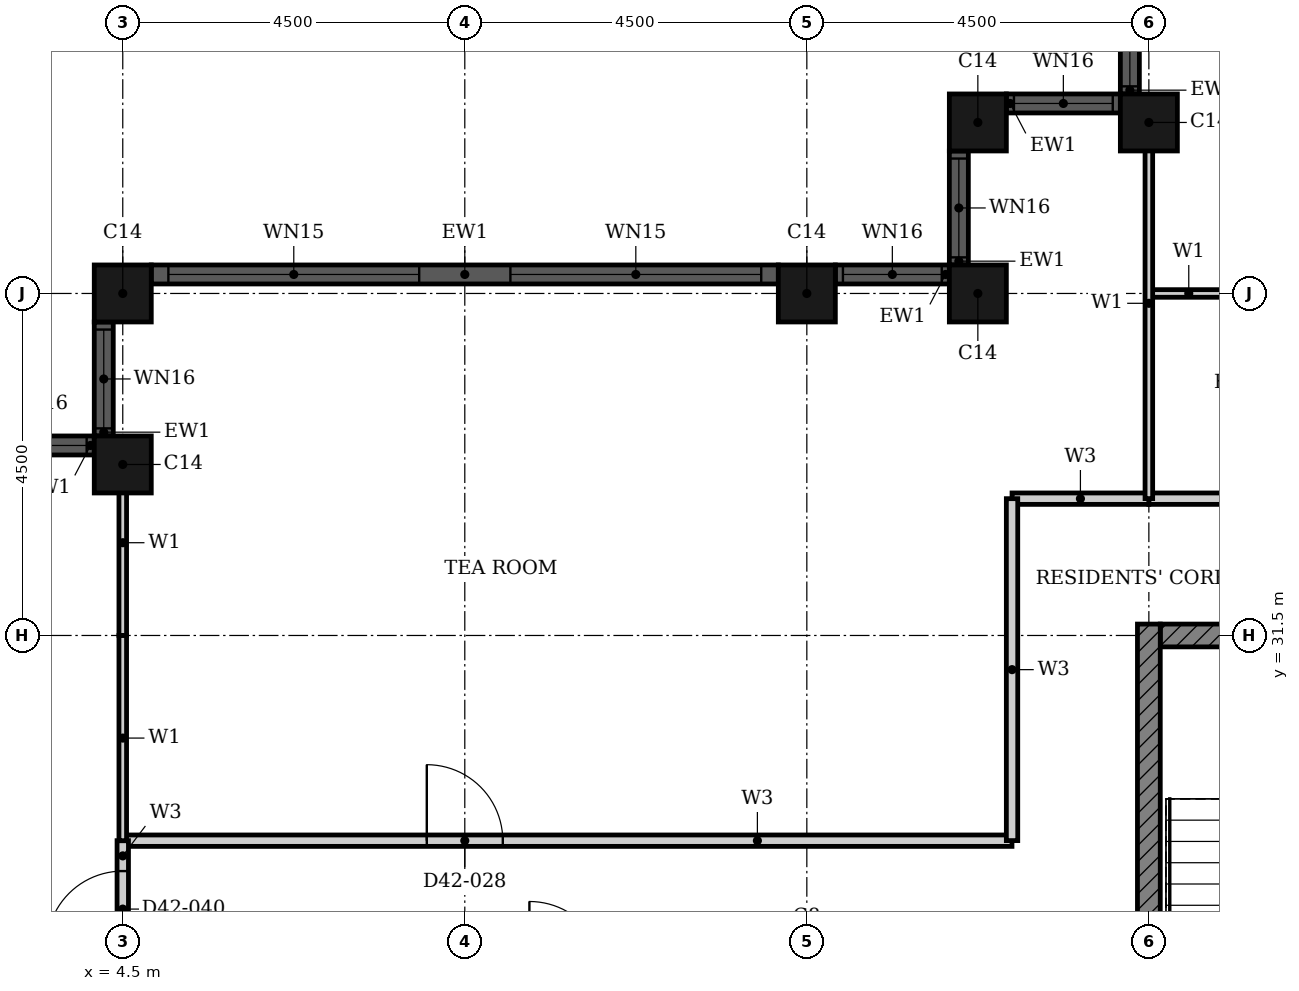
"""IFC4 building model, lengths in metres.
Left out: names, types, materials, properties, quantities, classifications, styles, units other than length and angle.
Written with IfcOpenShell. Run it as: python <this file> out.ifc"""

import sys

from ifc_helpers import new_model, si_unit, direction, frame, frame_2d, origin, origin_2d, place, context, subcontext, project, spatial, rectangle, hollow_rectangle, extrude, element, fill, save


model = new_model("IFC4")
c1 = context("Model", 3, precision=1e-05, world=origin(), true_north=direction((0.0, 1.0)))
c2 = subcontext(c1, "Body", "Model", "MODEL_VIEW")
j1 = project(units=[si_unit("LENGTHUNIT", "METRE"), si_unit("PLANEANGLEUNIT", "RADIAN")], contexts=[c1])
p1 = place(None, origin())
s1 = spatial("IfcSite", under=j1, at=p1, CompositionType="ELEMENT")
p2 = place(p1, origin())
s2 = spatial("IfcBuilding", under=s1, at=p2, CompositionType="ELEMENT")
p3 = place(p2, frame((0.0, 0.0, 169.1)))
s3 = spatial("IfcBuildingStorey", under=s2, at=p3, CompositionType="ELEMENT", Elevation=169.1)
for number, where, z_axis, x_axis in (
    (1, (18.0, 38.25, 0.0), (0.0, 0.0, 1.0), (1.0, 0.0, 0.0)),
    (2, (15.75, 38.25, 0.0), (0.0, 0.0, 1.0), (1.0, 0.0, 0.0)),
    (3, (15.75, 36.0, 0.0), (0.0, 0.0, 1.0), (1.0, 0.0, 0.0)),
    (4, (13.5, 36.0, 0.0), (0.0, 0.0, 1.0), (1.0, 0.0, 0.0)),
    (5, (4.5, 36.0, 0.0), (0.0, 0.0, 1.0), (1.0, 0.0, 0.0)),
    (6, (4.5, 33.75, 0.0), (0.0, 0.0, 1.0), (1.0, 0.0, 0.0)),
):
    element("IfcColumn", number, at=place(p3, frame(where, z_axis=z_axis, x_axis=x_axis)), inside=s3, PredefinedType="COLUMN", context=c2, shape_type="SweptSolid", body=[
        extrude(hollow_rectangle(XDim=0.75, YDim=0.75, WallThickness=0.024, at=origin_2d()), origin(), (0.0, 0.0, 1.0), 3.7),
    ])
p4 = place(p3, frame((17.75, 40.125, 0.0), z_axis=(0.0, 0.0, 1.0), x_axis=(0.0, -1.0, 0.0)))
e7 = element("IfcWall", 7, at=p4, inside=s3, PredefinedType="SOLIDWALL", context=c2, shape_type="SweptSolid", body=[
    extrude(rectangle(XDim=1.5, YDim=0.25, at=frame_2d((0.75, 0.0))), origin(), (0.0, 0.0, 1.0), 3.7),
])
p5 = place(p4, frame((0.1, 0.0, 0.9)))
e8 = element("IfcOpeningElement", 8, at=p5, cuts=e7, PredefinedType="OPENING", context=c2, shape_type="SweptSolid", body=[
    extrude(rectangle(XDim=1.3, YDim=1.85, at=frame_2d((0.65, 0.925))), frame((0.0, 0.135, 0.0), z_axis=(0.0, -1.0, 0.0), x_axis=(1.0, 0.0, 0.0)), (0.0, 0.0, 1.0), 0.27),
])
p6 = place(p3, frame((17.625, 38.5, 0.0), z_axis=(0.0, 0.0, 1.0), x_axis=(-1.0, 0.0, 0.0)))
e9 = element("IfcWall", 9, at=p6, inside=s3, PredefinedType="SOLIDWALL", context=c2, shape_type="SweptSolid", body=[
    extrude(rectangle(XDim=1.5, YDim=0.25, at=frame_2d((0.75, 0.0))), origin(), (0.0, 0.0, 1.0), 3.7),
])
p7 = place(p6, frame((0.1, 0.0, 0.9)))
e10 = element("IfcOpeningElement", 10, at=p7, cuts=e9, PredefinedType="OPENING", context=c2, shape_type="SweptSolid", body=[
    extrude(rectangle(XDim=1.3, YDim=1.85, at=frame_2d((0.65, 0.925))), frame((0.0, 0.135, 0.0), z_axis=(0.0, -1.0, 0.0), x_axis=(1.0, 0.0, 0.0)), (0.0, 0.0, 1.0), 0.27),
])
p8 = place(p3, frame((15.5, 37.875, 0.0), z_axis=(0.0, 0.0, 1.0), x_axis=(0.0, -1.0, 0.0)))
e11 = element("IfcWall", 11, at=p8, inside=s3, PredefinedType="SOLIDWALL", context=c2, shape_type="SweptSolid", body=[
    extrude(rectangle(XDim=1.5, YDim=0.25, at=frame_2d((0.75, 0.0))), origin(), (0.0, 0.0, 1.0), 3.7),
])
p9 = place(p8, frame((0.1, 0.0, 0.9)))
e12 = element("IfcOpeningElement", 12, at=p9, cuts=e11, PredefinedType="OPENING", context=c2, shape_type="SweptSolid", body=[
    extrude(rectangle(XDim=1.3, YDim=1.85, at=frame_2d((0.65, 0.925))), frame((0.0, 0.135, 0.0), z_axis=(0.0, -1.0, 0.0), x_axis=(1.0, 0.0, 0.0)), (0.0, 0.0, 1.0), 0.27),
])
p10 = place(p3, frame((15.375, 36.25, 0.0), z_axis=(0.0, 0.0, 1.0), x_axis=(-1.0, 0.0, 0.0)))
e13 = element("IfcWall", 13, at=p10, inside=s3, PredefinedType="SOLIDWALL", context=c2, shape_type="SweptSolid", body=[
    extrude(rectangle(XDim=1.5, YDim=0.25, at=frame_2d((0.75, 0.0))), origin(), (0.0, 0.0, 1.0), 3.7),
])
p11 = place(p10, frame((0.1, 0.0, 0.9)))
e14 = element("IfcOpeningElement", 14, at=p11, cuts=e13, PredefinedType="OPENING", context=c2, shape_type="SweptSolid", body=[
    extrude(rectangle(XDim=1.3, YDim=1.85, at=frame_2d((0.65, 0.925))), frame((0.0, 0.135, 0.0), z_axis=(0.0, -1.0, 0.0), x_axis=(1.0, 0.0, 0.0)), (0.0, 0.0, 1.0), 0.27),
])
p12 = place(p3, frame((13.125, 36.25, 0.0), z_axis=(0.0, 0.0, 1.0), x_axis=(-1.0, 0.0, 0.0)))
e15 = element("IfcWall", 15, at=p12, inside=s3, PredefinedType="SOLIDWALL", context=c2, shape_type="SweptSolid", body=[
    extrude(rectangle(XDim=8.25, YDim=0.25, at=frame_2d((4.125, 0.0))), origin(), (0.0, 0.0, 1.0), 3.7),
])
p13 = place(p12, frame((0.225, 0.0, 0.45)))
e16 = element("IfcOpeningElement", 16, at=p13, cuts=e15, PredefinedType="OPENING", context=c2, shape_type="SweptSolid", body=[
    extrude(rectangle(XDim=3.3, YDim=2.3, at=frame_2d((1.65, 1.15))), frame((0.0, 0.135, 0.0), z_axis=(0.0, -1.0, 0.0), x_axis=(1.0, 0.0, 0.0)), (0.0, 0.0, 1.0), 0.27),
])
p14 = place(p12, frame((4.725, 0.0, 0.45)))
e17 = element("IfcOpeningElement", 17, at=p14, cuts=e15, PredefinedType="OPENING", context=c2, shape_type="SweptSolid", body=[
    extrude(rectangle(XDim=3.3, YDim=2.3, at=frame_2d((1.65, 1.15))), frame((0.0, 0.135, 0.0), z_axis=(0.0, -1.0, 0.0), x_axis=(1.0, 0.0, 0.0)), (0.0, 0.0, 1.0), 0.27),
])
p15 = place(p3, frame((4.25, 35.625, 0.0), z_axis=(0.0, 0.0, 1.0), x_axis=(0.0, -1.0, 0.0)))
e18 = element("IfcWall", 18, at=p15, inside=s3, PredefinedType="SOLIDWALL", context=c2, shape_type="SweptSolid", body=[
    extrude(rectangle(XDim=1.5, YDim=0.25, at=frame_2d((0.75, 0.0))), origin(), (0.0, 0.0, 1.0), 3.7),
])
p16 = place(p15, frame((0.1, 0.0, 0.9)))
e19 = element("IfcOpeningElement", 19, at=p16, cuts=e18, PredefinedType="OPENING", context=c2, shape_type="SweptSolid", body=[
    extrude(rectangle(XDim=1.3, YDim=1.85, at=frame_2d((0.65, 0.925))), frame((0.0, 0.135, 0.0), z_axis=(0.0, -1.0, 0.0), x_axis=(1.0, 0.0, 0.0)), (0.0, 0.0, 1.0), 0.27),
])
p17 = place(p3, frame((4.125, 34.0, 0.0), z_axis=(0.0, 0.0, 1.0), x_axis=(-1.0, 0.0, 0.0)))
e20 = element("IfcWall", 20, at=p17, inside=s3, PredefinedType="SOLIDWALL", context=c2, shape_type="SweptSolid", body=[
    extrude(rectangle(XDim=1.5, YDim=0.25, at=frame_2d((0.75, 0.0))), origin(), (0.0, 0.0, 1.0), 3.7),
])
p18 = place(p17, frame((0.1, 0.0, 0.9)))
e21 = element("IfcOpeningElement", 21, at=p18, cuts=e20, PredefinedType="OPENING", context=c2, shape_type="SweptSolid", body=[
    extrude(rectangle(XDim=1.3, YDim=1.85, at=frame_2d((0.65, 0.925))), frame((0.0, 0.135, 0.0), z_axis=(0.0, -1.0, 0.0), x_axis=(1.0, 0.0, 0.0)), (0.0, 0.0, 1.0), 0.27),
])
p19 = place(p3, frame((18.15, 31.5, 0.0), z_axis=(0.0, 0.0, 1.0), x_axis=(1.0, 0.0, 0.0)))
e22 = element("IfcWall", 22, at=p19, inside=s3, PredefinedType="SHEAR", context=c2, shape_type="SweptSolid", body=[
    extrude(rectangle(XDim=9.368, YDim=0.3, at=frame_2d((4.684, 0.0))), origin(), (0.0, 0.0, 1.0), 3.4),
])
p20 = place(p19, frame((4.736, 0.0, 0.0)))
e23 = element("IfcOpeningElement", 23, at=p20, cuts=e22, PredefinedType="OPENING", context=c2, shape_type="SweptSolid", body=[
    extrude(rectangle(XDim=1.8, YDim=2.1, at=frame_2d((0.9, 1.05))), frame((0.0, 0.16, 0.0), z_axis=(0.0, -1.0, 0.0), x_axis=(1.0, 0.0, 0.0)), (0.0, 0.0, 1.0), 0.32),
])
p21 = place(p3, frame((18.0, 22.35, 0.0), z_axis=(0.0, 0.0, 1.0), x_axis=(0.0, 1.0, 0.0)))
e24 = element("IfcWall", 24, at=p21, inside=s3, PredefinedType="SHEAR", context=c2, shape_type="SweptSolid", body=[
    extrude(rectangle(XDim=9.3, YDim=0.3, at=frame_2d((4.65, 0.0))), origin(), (0.0, 0.0, 1.0), 3.4),
])
p22 = place(p3, frame((4.5, 28.8, 0.0), z_axis=(0.0, 0.0, 1.0), x_axis=(1.0, 0.0, 0.0)))
e25 = element("IfcWall", 25, at=p22, inside=s3, PredefinedType="PARTITIONING", context=c2, shape_type="SweptSolid", body=[
    extrude(rectangle(XDim=11.699, YDim=0.15, at=frame_2d((5.85, 0.0))), origin(), (0.0, 0.0, 1.0), 3.4),
])
p23 = place(p22, frame((4.0, 0.0, 0.0)))
e26 = element("IfcOpeningElement", 26, at=p23, cuts=e25, PredefinedType="OPENING", context=c2, shape_type="SweptSolid", body=[
    extrude(rectangle(XDim=1.0, YDim=2.1, at=frame_2d((0.5, 1.05))), frame((0.0, 0.085, 0.0), z_axis=(0.0, -1.0, 0.0), x_axis=(1.0, 0.0, 0.0)), (0.0, 0.0, 1.0), 0.17),
])
p24 = place(p3, frame((18.0, 33.3, 0.0), z_axis=(0.0, 0.0, 1.0), x_axis=(1.0, 0.0, 0.0)))
e27 = element("IfcWall", 27, at=p24, inside=s3, PredefinedType="PARTITIONING", context=c2, shape_type="SweptSolid", body=[
    extrude(rectangle(XDim=6.6, YDim=0.15, at=frame_2d((3.3, 0.0))), origin(), (0.0, 0.0, 1.0), 3.4),
])
p25 = place(p24, frame((4.3, 0.0, 0.0)))
e28 = element("IfcOpeningElement", 28, at=p25, cuts=e27, PredefinedType="OPENING", context=c2, shape_type="SweptSolid", body=[
    extrude(rectangle(XDim=1.0, YDim=2.2, at=frame_2d((0.5, 1.1))), frame((0.0, 0.085, 0.0), z_axis=(0.0, -1.0, 0.0), x_axis=(1.0, 0.0, 0.0)), (0.0, 0.0, 1.0), 0.17),
])
p26 = place(p3, frame((16.2, 33.3, 0.0), z_axis=(0.0, 0.0, 1.0), x_axis=(1.0, 0.0, 0.0)))
e29 = element("IfcWall", 29, at=p26, inside=s3, PredefinedType="PARTITIONING", context=c2, shape_type="SweptSolid", body=[
    extrude(rectangle(XDim=1.799, YDim=0.15, at=frame_2d((0.899, 0.0))), origin(), (0.0, 0.0, 1.0), 3.4),
])
p27 = place(p3, frame((16.2, 28.801, 0.0), z_axis=(0.0, 0.0, 1.0), x_axis=(0.0, 1.0, 0.0)))
e30 = element("IfcWall", 30, at=p27, inside=s3, PredefinedType="PARTITIONING", context=c2, shape_type="SweptSolid", body=[
    extrude(rectangle(XDim=4.499, YDim=0.15, at=frame_2d((2.25, 0.0))), origin(), (0.0, 0.0, 1.0), 3.4),
])
p28 = place(p3, frame((4.5, 27.0, 0.0), z_axis=(0.0, 0.0, 1.0), x_axis=(0.0, 1.0, 0.0)))
e31 = element("IfcWall", 31, at=p28, inside=s3, PredefinedType="PARTITIONING", context=c2, shape_type="SweptSolid", body=[
    extrude(rectangle(XDim=1.8, YDim=0.15, at=frame_2d((0.9, 0.0))), origin(), (0.0, 0.0, 1.0), 3.4),
])
p29 = place(p28, frame((0.4, 0.0, 0.0)))
e32 = element("IfcOpeningElement", 32, at=p29, cuts=e31, PredefinedType="OPENING", context=c2, shape_type="SweptSolid", body=[
    extrude(rectangle(XDim=1.0, YDim=2.2, at=frame_2d((0.5, 1.1))), frame((0.0, 0.085, 0.0), z_axis=(0.0, -1.0, 0.0), x_axis=(1.0, 0.0, 0.0)), (0.0, 0.0, 1.0), 0.17),
])
p30 = place(p3, frame((18.0, 36.0, 0.0), z_axis=(0.0, 0.0, 1.0), x_axis=(1.0, 0.0, 0.0)))
e33 = element("IfcWall", 33, at=p30, inside=s3, PredefinedType="PARTITIONING", context=c2, shape_type="SweptSolid", body=[
    extrude(rectangle(XDim=3.0, YDim=0.1, at=frame_2d((1.5, 0.0))), origin(), (0.0, 0.0, 1.0), 3.4),
])
p31 = place(p30, frame((1.05, 0.0, 0.0)))
e34 = element("IfcOpeningElement", 34, at=p31, cuts=e33, PredefinedType="OPENING", context=c2, shape_type="SweptSolid", body=[
    extrude(rectangle(XDim=0.9, YDim=2.1, at=frame_2d((0.45, 1.05))), frame((0.0, 0.06, 0.0), z_axis=(0.0, -1.0, 0.0), x_axis=(1.0, 0.0, 0.0)), (0.0, 0.0, 1.0), 0.12),
])
p32 = place(p3, frame((18.0, 33.301, 0.0), z_axis=(0.0, 0.0, 1.0), x_axis=(0.0, 1.0, 0.0)))
e35 = element("IfcWall", 35, at=p32, inside=s3, PredefinedType="PARTITIONING", context=c2, shape_type="SweptSolid", body=[
    extrude(rectangle(XDim=5.139, YDim=0.1, at=frame_2d((2.569, 0.0))), origin(), (0.0, 0.0, 1.0), 3.4),
])
p33 = place(p3, frame((4.5, 28.8, 0.0), z_axis=(0.0, 0.0, 1.0), x_axis=(0.0, 1.0, 0.0)))
e36 = element("IfcWall", 36, at=p33, inside=s3, PredefinedType="PARTITIONING", context=c2, shape_type="SweptSolid", body=[
    extrude(rectangle(XDim=2.7, YDim=0.1, at=frame_2d((1.35, 0.0))), origin(), (0.0, 0.0, 1.0), 3.4),
])
p34 = place(p3, frame((4.5, 31.501, 0.0), z_axis=(0.0, 0.0, 1.0), x_axis=(0.0, 1.0, 0.0)))
e37 = element("IfcWall", 37, at=p34, inside=s3, PredefinedType="PARTITIONING", context=c2, shape_type="SweptSolid", body=[
    extrude(rectangle(XDim=2.439, YDim=0.1, at=frame_2d((1.219, 0.0))), origin(), (0.0, 0.0, 1.0), 3.4),
])
p35 = place(p5, origin())
e38 = element("IfcWindow", 38, at=p35, inside=s3, PartitioningType="SINGLE_PANEL", PredefinedType="WINDOW", context=c2, shape_type="SweptSolid", body=[
    extrude(rectangle(XDim=1.3, YDim=1.85, at=frame_2d((0.65, 0.925))), frame((0.0, 0.03, 0.0), z_axis=(0.0, -1.0, 0.0), x_axis=(1.0, 0.0, 0.0)), (0.0, 0.0, 1.0), 0.06),
])
fill(e8, e38)
p36 = place(p7, origin())
e39 = element("IfcWindow", 39, at=p36, inside=s3, PartitioningType="SINGLE_PANEL", PredefinedType="WINDOW", context=c2, shape_type="SweptSolid", body=[
    extrude(rectangle(XDim=1.3, YDim=1.85, at=frame_2d((0.65, 0.925))), frame((0.0, 0.03, 0.0), z_axis=(0.0, -1.0, 0.0), x_axis=(1.0, 0.0, 0.0)), (0.0, 0.0, 1.0), 0.06),
])
fill(e10, e39)
p37 = place(p9, origin())
e40 = element("IfcWindow", 40, at=p37, inside=s3, PartitioningType="SINGLE_PANEL", PredefinedType="WINDOW", context=c2, shape_type="SweptSolid", body=[
    extrude(rectangle(XDim=1.3, YDim=1.85, at=frame_2d((0.65, 0.925))), frame((0.0, 0.03, 0.0), z_axis=(0.0, -1.0, 0.0), x_axis=(1.0, 0.0, 0.0)), (0.0, 0.0, 1.0), 0.06),
])
fill(e12, e40)
p38 = place(p11, origin())
e41 = element("IfcWindow", 41, at=p38, inside=s3, PartitioningType="SINGLE_PANEL", PredefinedType="WINDOW", context=c2, shape_type="SweptSolid", body=[
    extrude(rectangle(XDim=1.3, YDim=1.85, at=frame_2d((0.65, 0.925))), frame((0.0, 0.03, 0.0), z_axis=(0.0, -1.0, 0.0), x_axis=(1.0, 0.0, 0.0)), (0.0, 0.0, 1.0), 0.06),
])
fill(e14, e41)
p39 = place(p13, origin())
e42 = element("IfcWindow", 42, at=p39, inside=s3, PartitioningType="SINGLE_PANEL", PredefinedType="WINDOW", context=c2, shape_type="SweptSolid", body=[
    extrude(rectangle(XDim=3.3, YDim=2.3, at=frame_2d((1.65, 1.15))), frame((0.0, 0.03, 0.0), z_axis=(0.0, -1.0, 0.0), x_axis=(1.0, 0.0, 0.0)), (0.0, 0.0, 1.0), 0.06),
])
fill(e16, e42)
p40 = place(p14, origin())
e43 = element("IfcWindow", 43, at=p40, inside=s3, PartitioningType="SINGLE_PANEL", PredefinedType="WINDOW", context=c2, shape_type="SweptSolid", body=[
    extrude(rectangle(XDim=3.3, YDim=2.3, at=frame_2d((1.65, 1.15))), frame((0.0, 0.03, 0.0), z_axis=(0.0, -1.0, 0.0), x_axis=(1.0, 0.0, 0.0)), (0.0, 0.0, 1.0), 0.06),
])
fill(e17, e43)
p41 = place(p16, origin())
e44 = element("IfcWindow", 44, at=p41, inside=s3, PartitioningType="SINGLE_PANEL", PredefinedType="WINDOW", context=c2, shape_type="SweptSolid", body=[
    extrude(rectangle(XDim=1.3, YDim=1.85, at=frame_2d((0.65, 0.925))), frame((0.0, 0.03, 0.0), z_axis=(0.0, -1.0, 0.0), x_axis=(1.0, 0.0, 0.0)), (0.0, 0.0, 1.0), 0.06),
])
fill(e19, e44)
p42 = place(p18, origin())
e45 = element("IfcWindow", 45, at=p42, inside=s3, PartitioningType="SINGLE_PANEL", PredefinedType="WINDOW", context=c2, shape_type="SweptSolid", body=[
    extrude(rectangle(XDim=1.3, YDim=1.85, at=frame_2d((0.65, 0.925))), frame((0.0, 0.03, 0.0), z_axis=(0.0, -1.0, 0.0), x_axis=(1.0, 0.0, 0.0)), (0.0, 0.0, 1.0), 0.06),
])
fill(e21, e45)
p43 = place(p23, origin())
e46 = element("IfcDoor", 46, at=p43, inside=s3, OperationType="SINGLE_SWING_RIGHT", PredefinedType="DOOR", context=c2, shape_type="SweptSolid", body=[
    extrude(rectangle(XDim=1.0, YDim=2.1, at=frame_2d((0.5, 1.05))), frame((0.0, 0.025, 0.0), z_axis=(0.0, -1.0, 0.0), x_axis=(1.0, 0.0, 0.0)), (0.0, 0.0, 1.0), 0.05),
])
fill(e26, e46)
p44 = place(p29, origin())
e47 = element("IfcDoor", 47, at=p44, inside=s3, OperationType="SINGLE_SWING_RIGHT", PredefinedType="DOOR", context=c2, shape_type="SweptSolid", body=[
    extrude(rectangle(XDim=1.0, YDim=2.2, at=frame_2d((0.5, 1.1))), frame((0.0, 0.025, 0.0), z_axis=(0.0, -1.0, 0.0), x_axis=(1.0, 0.0, 0.0)), (0.0, 0.0, 1.0), 0.05),
])
fill(e32, e47)
save(model, sys.argv[1])
